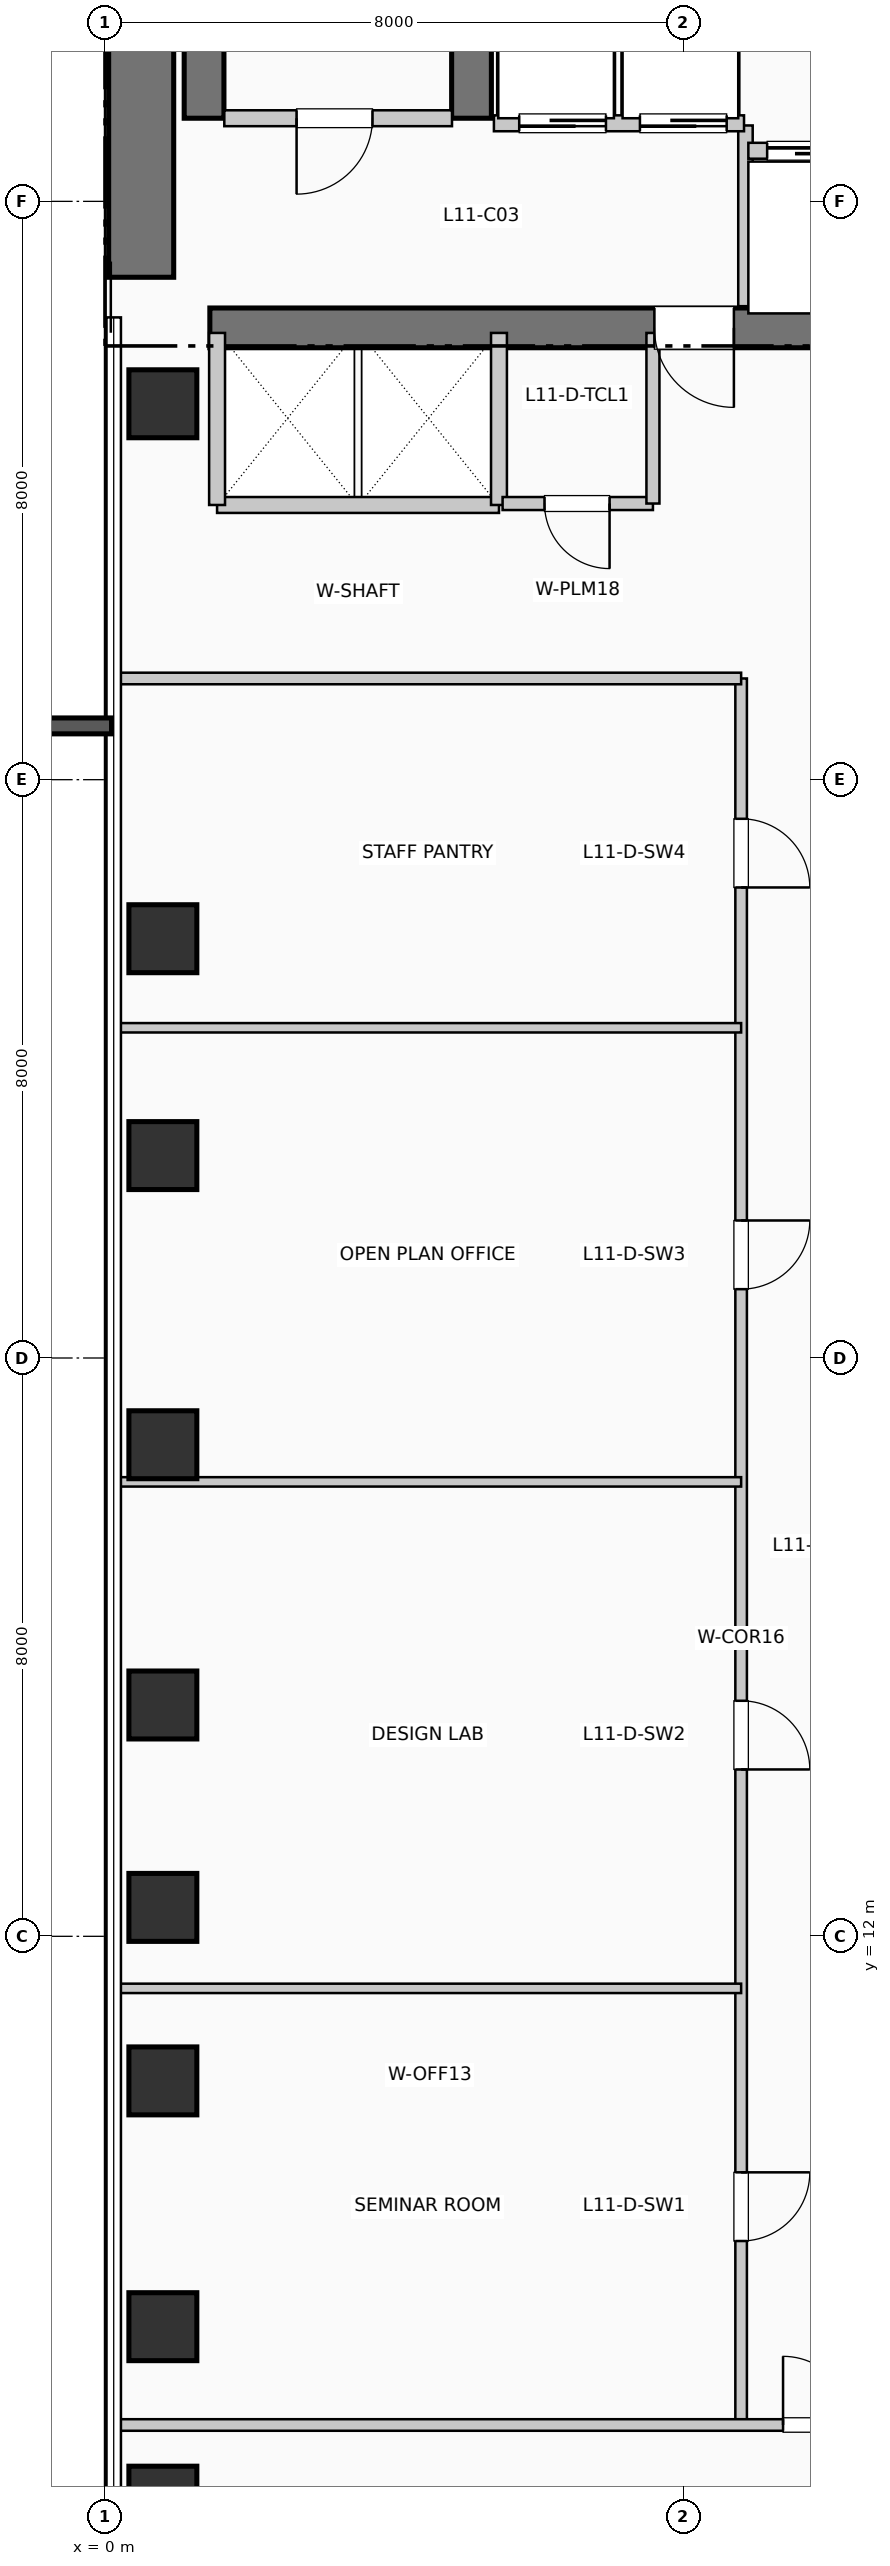
"""IFC4 building model, lengths in metres.
Left out: names, types, materials, properties, quantities, classifications, styles, units other than length and angle.
Written with IfcOpenShell. Run it as: python <this file> out.ifc"""

import sys

from ifc_helpers import new_model, si_unit, direction, frame, frame_2d, origin, origin_2d, place, context, subcontext, project, spatial, rectangle, extrude, element, fill, save


model = new_model("IFC4")
c1 = context("Model", 3, precision=1e-05, world=origin(), true_north=direction((0.0, 1.0)))
c2 = subcontext(c1, "Body", "Model", "MODEL_VIEW")
j1 = project(units=[si_unit("LENGTHUNIT", "METRE"), si_unit("PLANEANGLEUNIT", "RADIAN")], contexts=[c1])
p1 = place(None, origin())
s1 = spatial("IfcSite", under=j1, at=p1, CompositionType="ELEMENT")
p2 = place(p1, origin())
s2 = spatial("IfcBuilding", under=s1, at=p2, CompositionType="ELEMENT")
p3 = place(p2, frame((0.0, 0.0, 50.16)))
s3 = spatial("IfcBuildingStorey", under=s2, at=p3, CompositionType="ELEMENT", Elevation=50.16)
p4 = place(p3, frame((0.5, 34.95, 0.0), z_axis=(0.0, 0.0, 1.0), x_axis=(0.0, 1.0, 0.0)))
e1 = element("IfcWall", 1, at=p4, inside=s3, PredefinedType="SHEAR", context=c2, shape_type="SweptSolid", body=[
    extrude(rectangle(XDim=7.9, YDim=0.9, at=frame_2d((3.95, 0.0))), origin(), (0.0, 0.0, 1.0), 3.96),
])
p5 = place(p3, frame((1.45, 34.25, 0.0), z_axis=(0.0, 0.0, 1.0), x_axis=(1.0, 0.0, 0.0)))
e2 = element("IfcWall", 2, at=p5, inside=s3, PredefinedType="SHEAR", context=c2, shape_type="SweptSolid", body=[
    extrude(rectangle(XDim=10.71, YDim=0.55, at=frame_2d((5.355, 0.0))), origin(), (0.0, 0.0, 1.0), 3.96),
])
p6 = place(p5, frame((7.25, 0.0, 0.0), z_axis=(0.0, 0.0, 1.0), x_axis=(-1.0, 0.0, 0.0)))
e3 = element("IfcOpeningElement", 3, at=p6, cuts=e2, PredefinedType="OPENING", context=c2, shape_type="SweptSolid", body=[
    extrude(rectangle(XDim=1.1, YDim=2.15, at=frame_2d((0.55, 1.075))), frame((0.0, 0.285, 0.0), z_axis=(0.0, -1.0, 0.0), x_axis=(1.0, 0.0, 0.0)), (0.0, 0.0, 1.0), 0.57),
])
for number, where, z_axis, x_axis in (
    (4, (1.37, 37.15, 0.0), (0.0, 0.0, 1.0), (0.0, 1.0, 0.0)),
    (5, (5.07, 37.15, 0.0), (0.0, 0.0, 1.0), (0.0, 1.0, 0.0)),
):
    element("IfcWall", number, at=place(p3, frame(where, z_axis=z_axis, x_axis=x_axis)), inside=s3, PredefinedType="SHEAR", context=c2, shape_type="SweptSolid", body=[
        extrude(rectangle(XDim=7.89, YDim=0.55, at=frame_2d((3.945, 0.0))), origin(), (0.0, 0.0, 1.0), 3.96),
    ])
for number, where, z_axis, x_axis in (
    (6, (0.8, 4.2, 0.0), (0.0, 0.0, 1.0), (1.0, 0.0, 0.0)),
    (7, (0.8, 6.6, 0.0), (0.0, 0.0, 1.0), (1.0, 0.0, 0.0)),
    (8, (0.8, 10.0, 0.0), (0.0, 0.0, 1.0), (1.0, 0.0, 0.0)),
    (9, (0.8, 12.4, 0.0), (0.0, 0.0, 1.0), (1.0, 0.0, 0.0)),
    (10, (0.8, 15.2, 0.0), (0.0, 0.0, 1.0), (1.0, 0.0, 0.0)),
    (11, (0.8, 18.8, 0.0), (0.0, 0.0, 1.0), (1.0, 0.0, 0.0)),
    (12, (0.8, 22.8, 0.0), (0.0, 0.0, 1.0), (1.0, 0.0, 0.0)),
    (13, (0.8, 25.8, 0.0), (0.0, 0.0, 1.0), (1.0, 0.0, 0.0)),
    (14, (0.8, 33.2, 0.0), (0.0, 0.0, 1.0), (1.0, 0.0, 0.0)),
):
    element("IfcColumn", number, at=place(p3, frame(where, z_axis=z_axis, x_axis=x_axis)), inside=s3, PredefinedType="COLUMN", context=c2, shape_type="SweptSolid", body=[
        extrude(rectangle(XDim=0.94, YDim=0.94, at=origin_2d()), origin(), (0.0, 0.0, 1.0), 3.96),
    ])
p7 = place(p3, frame((1.65, 37.15, 0.0), z_axis=(0.0, 0.0, 1.0), x_axis=(1.0, 0.0, 0.0)))
e15 = element("IfcWall", 15, at=p7, inside=s3, PredefinedType="PARTITIONING", context=c2, shape_type="SweptSolid", body=[
    extrude(rectangle(XDim=3.15, YDim=0.22, at=frame_2d((1.575, 0.0))), origin(), (0.0, 0.0, 1.0), 3.71),
])
p8 = place(p7, frame((2.05, 0.0, 0.0), z_axis=(0.0, 0.0, 1.0), x_axis=(-1.0, 0.0, 0.0)))
e16 = element("IfcOpeningElement", 16, at=p8, cuts=e15, PredefinedType="OPENING", context=c2, shape_type="SweptSolid", body=[
    extrude(rectangle(XDim=1.05, YDim=2.15, at=frame_2d((0.525, 1.075))), frame((0.0, 0.12, 0.0), z_axis=(0.0, -1.0, 0.0), x_axis=(1.0, 0.0, 0.0)), (0.0, 0.0, 1.0), 0.24),
])
p9 = place(p3, frame((8.86, 34.55, 0.0), z_axis=(0.0, 0.0, 1.0), x_axis=(0.0, 1.0, 0.0)))
e17 = element("IfcWall", 17, at=p9, inside=s3, PredefinedType="PARTITIONING", context=c2, shape_type="SweptSolid", body=[
    extrude(rectangle(XDim=2.5, YDim=0.2, at=frame_2d((1.25, 0.0))), origin(), (0.0, 0.0, 1.0), 3.71),
])
p10 = place(p3, frame((5.38, 37.08, 0.0), z_axis=(0.0, 0.0, 1.0), x_axis=(1.0, 0.0, 0.0)))
e18 = element("IfcWall", 18, at=p10, inside=s3, PredefinedType="PARTITIONING", context=c2, shape_type="SweptSolid", body=[
    extrude(rectangle(XDim=3.46, YDim=0.22, at=frame_2d((1.73, 0.0))), origin(), (0.0, 0.0, 1.0), 3.71),
])
p11 = place(p10, frame((1.55, 0.0, 0.0), z_axis=(0.0, 0.0, 1.0), x_axis=(-1.0, 0.0, 0.0)))
e19 = element("IfcOpeningElement", 19, at=p11, cuts=e18, PredefinedType="OPENING", context=c2, shape_type="SweptSolid", body=[
    extrude(rectangle(XDim=1.2, YDim=2.2, at=frame_2d((0.6, 1.1))), frame((0.0, 0.12, 0.0), z_axis=(0.0, -1.0, 0.0), x_axis=(1.0, 0.0, 0.0)), (0.0, 0.0, 1.0), 0.24),
])
p12 = place(p10, frame((3.22, 0.0, 0.0), z_axis=(0.0, 0.0, 1.0), x_axis=(-1.0, 0.0, 0.0)))
e20 = element("IfcOpeningElement", 20, at=p12, cuts=e18, PredefinedType="OPENING", context=c2, shape_type="SweptSolid", body=[
    extrude(rectangle(XDim=1.2, YDim=2.2, at=frame_2d((0.6, 1.1))), frame((0.0, 0.12, 0.0), z_axis=(0.0, -1.0, 0.0), x_axis=(1.0, 0.0, 0.0)), (0.0, 0.0, 1.0), 0.24),
])
p13 = place(p3, frame((1.55, 31.8, 0.0), z_axis=(0.0, 0.0, 1.0), x_axis=(1.0, 0.0, 0.0)))
e21 = element("IfcWall", 21, at=p13, inside=s3, PredefinedType="PARTITIONING", context=c2, shape_type="SweptSolid", body=[
    extrude(rectangle(XDim=3.9, YDim=0.22, at=frame_2d((1.95, 0.0))), origin(), (0.0, 0.0, 1.0), 3.71),
])
for number, where, z_axis, x_axis in (
    (22, (1.55, 31.8, 0.0), (0.0, 0.0, 1.0), (0.0, 1.0, 0.0)),
    (23, (5.45, 31.8, 0.0), (0.0, 0.0, 1.0), (0.0, 1.0, 0.0)),
):
    element("IfcWall", number, at=place(p3, frame(where, z_axis=z_axis, x_axis=x_axis)), inside=s3, PredefinedType="PARTITIONING", context=c2, shape_type="SweptSolid", body=[
        extrude(rectangle(XDim=2.38, YDim=0.22, at=frame_2d((1.19, 0.0))), origin(), (0.0, 0.0, 1.0), 3.71),
    ])
p14 = place(p3, frame((5.5, 31.82, 0.0), z_axis=(0.0, 0.0, 1.0), x_axis=(1.0, 0.0, 0.0)))
e24 = element("IfcWall", 24, at=p14, inside=s3, PredefinedType="PLUMBINGWALL", context=c2, shape_type="SweptSolid", body=[
    extrude(rectangle(XDim=2.08, YDim=0.18, at=frame_2d((1.04, 0.0))), origin(), (0.0, 0.0, 1.0), 3.71),
])
p15 = place(p14, frame((1.48, 0.0, 0.0), z_axis=(0.0, 0.0, 1.0), x_axis=(-1.0, 0.0, 0.0)))
e25 = element("IfcOpeningElement", 25, at=p15, cuts=e24, PredefinedType="OPENING", context=c2, shape_type="SweptSolid", body=[
    extrude(rectangle(XDim=0.9, YDim=2.1, at=frame_2d((0.45, 1.05))), frame((0.0, 0.1, 0.0), z_axis=(0.0, -1.0, 0.0), x_axis=(1.0, 0.0, 0.0)), (0.0, 0.0, 1.0), 0.2),
])
p16 = place(p3, frame((7.58, 31.82, 0.0), z_axis=(0.0, 0.0, 1.0), x_axis=(0.0, 1.0, 0.0)))
e26 = element("IfcWall", 26, at=p16, inside=s3, PredefinedType="PLUMBINGWALL", context=c2, shape_type="SweptSolid", body=[
    extrude(rectangle(XDim=2.36, YDim=0.18, at=frame_2d((1.18, 0.0))), origin(), (0.0, 0.0, 1.0), 3.71),
])
p17 = place(p3, frame((8.9, 36.7, 0.0), z_axis=(0.0, 0.0, 1.0), x_axis=(1.0, 0.0, 0.0)))
e27 = element("IfcWall", 27, at=p17, inside=s3, PredefinedType="PARTITIONING", context=c2, shape_type="SweptSolid", body=[
    extrude(rectangle(XDim=3.26, YDim=0.22, at=frame_2d((1.63, 0.0))), origin(), (0.0, 0.0, 1.0), 3.71),
])
p18 = place(p17, frame((0.26, 0.0, 0.0)))
e28 = element("IfcOpeningElement", 28, at=p18, cuts=e27, PredefinedType="OPENING", context=c2, shape_type="SweptSolid", body=[
    extrude(rectangle(XDim=1.1, YDim=2.2, at=frame_2d((0.55, 1.1))), frame((0.0, 0.12, 0.0), z_axis=(0.0, -1.0, 0.0), x_axis=(1.0, 0.0, 0.0)), (0.0, 0.0, 1.0), 0.24),
])
p19 = place(p17, frame((1.88, 0.0, 0.0)))
e29 = element("IfcOpeningElement", 29, at=p19, cuts=e27, PredefinedType="OPENING", context=c2, shape_type="SweptSolid", body=[
    extrude(rectangle(XDim=1.1, YDim=2.2, at=frame_2d((0.55, 1.1))), frame((0.0, 0.12, 0.0), z_axis=(0.0, -1.0, 0.0), x_axis=(1.0, 0.0, 0.0)), (0.0, 0.0, 1.0), 0.24),
])
p20 = place(p3, frame((8.8, 5.24, 0.0), z_axis=(0.0, 0.0, 1.0), x_axis=(0.0, 1.0, 0.0)))
e30 = element("IfcWall", 30, at=p20, inside=s3, PredefinedType="PARTITIONING", context=c2, shape_type="SweptSolid", body=[
    extrude(rectangle(XDim=24.16, YDim=0.16, at=frame_2d((12.08, 0.0))), origin(), (0.0, 0.0, 1.0), 3.71),
])
p21 = place(p20, frame((3.495, 0.0, 0.0), z_axis=(0.0, 0.0, 1.0), x_axis=(-1.0, 0.0, 0.0)))
e31 = element("IfcOpeningElement", 31, at=p21, cuts=e30, PredefinedType="OPENING", context=c2, shape_type="SweptSolid", body=[
    extrude(rectangle(XDim=0.95, YDim=2.15, at=frame_2d((0.475, 1.075))), frame((0.0, 0.09, 0.0), z_axis=(0.0, -1.0, 0.0), x_axis=(1.0, 0.0, 0.0)), (0.0, 0.0, 1.0), 0.18),
])
p22 = place(p20, frame((10.018, 0.0, 0.0), z_axis=(0.0, 0.0, 1.0), x_axis=(-1.0, 0.0, 0.0)))
e32 = element("IfcOpeningElement", 32, at=p22, cuts=e30, PredefinedType="OPENING", context=c2, shape_type="SweptSolid", body=[
    extrude(rectangle(XDim=0.95, YDim=2.15, at=frame_2d((0.475, 1.075))), frame((0.0, 0.09, 0.0), z_axis=(0.0, -1.0, 0.0), x_axis=(1.0, 0.0, 0.0)), (0.0, 0.0, 1.0), 0.18),
])
p23 = place(p20, frame((16.662, 0.0, 0.0), z_axis=(0.0, 0.0, 1.0), x_axis=(-1.0, 0.0, 0.0)))
e33 = element("IfcOpeningElement", 33, at=p23, cuts=e30, PredefinedType="OPENING", context=c2, shape_type="SweptSolid", body=[
    extrude(rectangle(XDim=0.95, YDim=2.15, at=frame_2d((0.475, 1.075))), frame((0.0, 0.09, 0.0), z_axis=(0.0, -1.0, 0.0), x_axis=(1.0, 0.0, 0.0)), (0.0, 0.0, 1.0), 0.18),
])
p24 = place(p20, frame((22.219, 0.0, 0.0), z_axis=(0.0, 0.0, 1.0), x_axis=(-1.0, 0.0, 0.0)))
e34 = element("IfcOpeningElement", 34, at=p24, cuts=e30, PredefinedType="OPENING", context=c2, shape_type="SweptSolid", body=[
    extrude(rectangle(XDim=0.95, YDim=2.15, at=frame_2d((0.475, 1.075))), frame((0.0, 0.09, 0.0), z_axis=(0.0, -1.0, 0.0), x_axis=(1.0, 0.0, 0.0)), (0.0, 0.0, 1.0), 0.18),
])
p25 = place(p3, frame((0.19, 5.24, 0.0), z_axis=(0.0, 0.0, 1.0), x_axis=(1.0, 0.0, 0.0)))
e35 = element("IfcWall", 35, at=p25, inside=s3, PredefinedType="PARTITIONING", context=c2, shape_type="SweptSolid", body=[
    extrude(rectangle(XDim=23.26, YDim=0.16, at=frame_2d((11.63, 0.0))), origin(), (0.0, 0.0, 1.0), 3.71),
])
p26 = place(p25, frame((9.19, 0.0, 0.0)))
e36 = element("IfcOpeningElement", 36, at=p26, cuts=e35, PredefinedType="OPENING", context=c2, shape_type="SweptSolid", body=[
    extrude(rectangle(XDim=0.95, YDim=2.15, at=frame_2d((0.475, 1.075))), frame((0.0, 0.09, 0.0), z_axis=(0.0, -1.0, 0.0), x_axis=(1.0, 0.0, 0.0)), (0.0, 0.0, 1.0), 0.18),
])
p27 = place(p3, frame((0.19, 29.4, 0.0), z_axis=(0.0, 0.0, 1.0), x_axis=(1.0, 0.0, 0.0)))
e37 = element("IfcWall", 37, at=p27, inside=s3, PredefinedType="PARTITIONING", context=c2, shape_type="SweptSolid", body=[
    extrude(rectangle(XDim=8.61, YDim=0.16, at=frame_2d((4.305, 0.0))), origin(), (0.0, 0.0, 1.0), 3.365),
])
for number, where, z_axis, x_axis in (
    (38, (0.19, 11.28, 0.0), (0.0, 0.0, 1.0), (1.0, 0.0, 0.0)),
    (39, (0.19, 18.286, 0.0), (0.0, 0.0, 1.0), (1.0, 0.0, 0.0)),
    (40, (0.19, 24.568, 0.0), (0.0, 0.0, 1.0), (1.0, 0.0, 0.0)),
):
    element("IfcWall", number, at=place(p3, frame(where, z_axis=z_axis, x_axis=x_axis)), inside=s3, PredefinedType="PARTITIONING", context=c2, shape_type="SweptSolid", body=[
        extrude(rectangle(XDim=8.61, YDim=0.13, at=frame_2d((4.305, 0.0))), origin(), (0.0, 0.0, 1.0), 3.71),
    ])
p28 = place(p8, origin())
e41 = element("IfcDoor", 41, at=p28, inside=s3, OperationType="SINGLE_SWING_LEFT", PredefinedType="DOOR", context=c2, shape_type="SweptSolid", body=[
    extrude(rectangle(XDim=1.05, YDim=2.15, at=frame_2d((0.525, 1.075))), frame((0.0, 0.025, 0.0), z_axis=(0.0, -1.0, 0.0), x_axis=(1.0, 0.0, 0.0)), (0.0, 0.0, 1.0), 0.05),
])
fill(e16, e41)
p29 = place(p6, origin())
e42 = element("IfcDoor", 42, at=p29, inside=s3, OperationType="SINGLE_SWING_RIGHT", PredefinedType="DOOR", context=c2, shape_type="SweptSolid", body=[
    extrude(rectangle(XDim=1.1, YDim=2.15, at=frame_2d((0.55, 1.075))), frame((0.0, 0.025, 0.0), z_axis=(0.0, -1.0, 0.0), x_axis=(1.0, 0.0, 0.0)), (0.0, 0.0, 1.0), 0.05),
])
fill(e3, e42)
p30 = place(p11, origin())
e43 = element("IfcDoor", 43, at=p30, inside=s3, OperationType="SLIDING_TO_RIGHT", PredefinedType="DOOR", context=c2, shape_type="SweptSolid", body=[
    extrude(rectangle(XDim=1.2, YDim=2.2, at=frame_2d((0.6, 1.1))), frame((0.0, 0.025, 0.0), z_axis=(0.0, -1.0, 0.0), x_axis=(1.0, 0.0, 0.0)), (0.0, 0.0, 1.0), 0.05),
])
fill(e19, e43)
p31 = place(p12, origin())
e44 = element("IfcDoor", 44, at=p31, inside=s3, OperationType="SLIDING_TO_RIGHT", PredefinedType="DOOR", context=c2, shape_type="SweptSolid", body=[
    extrude(rectangle(XDim=1.2, YDim=2.2, at=frame_2d((0.6, 1.1))), frame((0.0, 0.025, 0.0), z_axis=(0.0, -1.0, 0.0), x_axis=(1.0, 0.0, 0.0)), (0.0, 0.0, 1.0), 0.05),
])
fill(e20, e44)
p32 = place(p15, origin())
e45 = element("IfcDoor", 45, at=p32, inside=s3, OperationType="SINGLE_SWING_RIGHT", PredefinedType="DOOR", context=c2, shape_type="SweptSolid", body=[
    extrude(rectangle(XDim=0.9, YDim=2.1, at=frame_2d((0.45, 1.05))), frame((0.0, 0.025, 0.0), z_axis=(0.0, -1.0, 0.0), x_axis=(1.0, 0.0, 0.0)), (0.0, 0.0, 1.0), 0.05),
])
fill(e25, e45)
p33 = place(p18, origin())
e46 = element("IfcDoor", 46, at=p33, inside=s3, OperationType="SLIDING_TO_LEFT", PredefinedType="DOOR", context=c2, shape_type="SweptSolid", body=[
    extrude(rectangle(XDim=1.1, YDim=2.2, at=frame_2d((0.55, 1.1))), frame((0.0, 0.025, 0.0), z_axis=(0.0, -1.0, 0.0), x_axis=(1.0, 0.0, 0.0)), (0.0, 0.0, 1.0), 0.05),
])
fill(e28, e46)
p34 = place(p26, origin())
e47 = element("IfcDoor", 47, at=p34, inside=s3, OperationType="SINGLE_SWING_LEFT", PredefinedType="DOOR", context=c2, shape_type="SweptSolid", body=[
    extrude(rectangle(XDim=0.95, YDim=2.15, at=frame_2d((0.475, 1.075))), frame((0.0, 0.025, 0.0), z_axis=(0.0, -1.0, 0.0), x_axis=(1.0, 0.0, 0.0)), (0.0, 0.0, 1.0), 0.05),
])
fill(e36, e47)
p35 = place(p21, origin())
e48 = element("IfcDoor", 48, at=p35, inside=s3, OperationType="SINGLE_SWING_RIGHT", PredefinedType="DOOR", context=c2, shape_type="SweptSolid", body=[
    extrude(rectangle(XDim=0.95, YDim=2.15, at=frame_2d((0.475, 1.075))), frame((0.0, 0.025, 0.0), z_axis=(0.0, -1.0, 0.0), x_axis=(1.0, 0.0, 0.0)), (0.0, 0.0, 1.0), 0.05),
])
fill(e31, e48)
p36 = place(p22, origin())
e49 = element("IfcDoor", 49, at=p36, inside=s3, OperationType="SINGLE_SWING_LEFT", PredefinedType="DOOR", context=c2, shape_type="SweptSolid", body=[
    extrude(rectangle(XDim=0.95, YDim=2.15, at=frame_2d((0.475, 1.075))), frame((0.0, 0.025, 0.0), z_axis=(0.0, -1.0, 0.0), x_axis=(1.0, 0.0, 0.0)), (0.0, 0.0, 1.0), 0.05),
])
fill(e32, e49)
p37 = place(p23, origin())
e50 = element("IfcDoor", 50, at=p37, inside=s3, OperationType="SINGLE_SWING_RIGHT", PredefinedType="DOOR", context=c2, shape_type="SweptSolid", body=[
    extrude(rectangle(XDim=0.95, YDim=2.15, at=frame_2d((0.475, 1.075))), frame((0.0, 0.025, 0.0), z_axis=(0.0, -1.0, 0.0), x_axis=(1.0, 0.0, 0.0)), (0.0, 0.0, 1.0), 0.05),
])
fill(e33, e50)
p38 = place(p24, origin())
e51 = element("IfcDoor", 51, at=p38, inside=s3, OperationType="SINGLE_SWING_LEFT", PredefinedType="DOOR", context=c2, shape_type="SweptSolid", body=[
    extrude(rectangle(XDim=0.95, YDim=2.15, at=frame_2d((0.475, 1.075))), frame((0.0, 0.025, 0.0), z_axis=(0.0, -1.0, 0.0), x_axis=(1.0, 0.0, 0.0)), (0.0, 0.0, 1.0), 0.05),
])
fill(e34, e51)
save(model, sys.argv[1])
